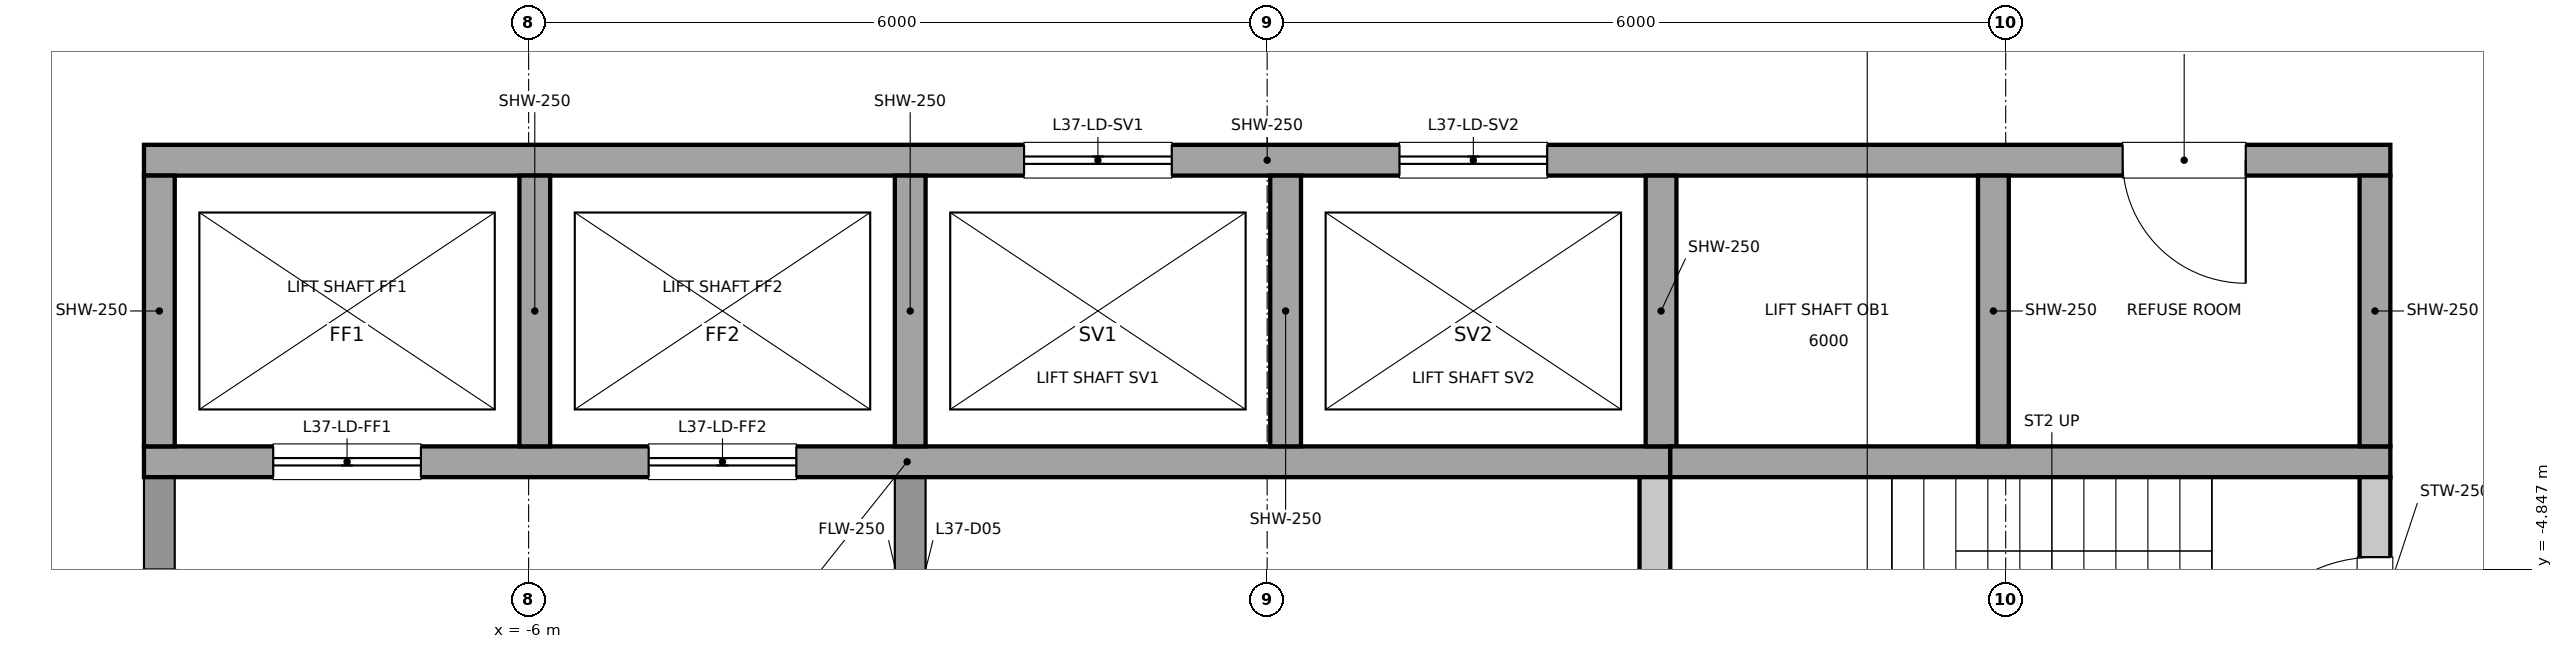
"""IFC4 building model, lengths in metres.
Left out: names, types, materials, properties, quantities, classifications, styles, units other than length and angle.
Written with IfcOpenShell. Run it as: python <this file> out.ifc"""

import sys

from ifc_helpers import new_model, si_unit, direction, frame, frame_2d, origin, place, context, subcontext, project, spatial, rectangle, extrude, element, fill, save


model = new_model("IFC4")
c1 = context("Model", 3, precision=1e-05, world=origin(), true_north=direction((0.0, 1.0)))
c2 = subcontext(c1, "Body", "Model", "MODEL_VIEW")
j1 = project(units=[si_unit("LENGTHUNIT", "METRE"), si_unit("PLANEANGLEUNIT", "RADIAN")], contexts=[c1])
p1 = place(None, origin())
s1 = spatial("IfcSite", under=j1, at=p1, CompositionType="ELEMENT")
p2 = place(p1, origin())
s2 = spatial("IfcBuilding", under=s1, at=p2, CompositionType="ELEMENT")
p3 = place(p2, frame((0.0, 0.0, 177.6)))
s3 = spatial("IfcBuildingStorey", under=s2, at=p3, CompositionType="ELEMENT", Elevation=177.6)
p4 = place(p3, frame((9.0, -6.6, 0.0), z_axis=(0.0, 0.0, 1.0), x_axis=(0.0, 1.0, 0.0)))
e1 = element("IfcWall", 1, at=p4, inside=s3, PredefinedType="SOLIDWALL", context=c2, shape_type="SweptSolid", body=[
    extrude(rectangle(XDim=2.5, YDim=0.25, at=frame_2d((1.25, 0.0))), origin(), (0.0, 0.0, 1.0), 3.85),
])
p5 = place(p4, frame((0.65, 0.0, 0.0)))
e2 = element("IfcOpeningElement", 2, at=p5, cuts=e1, PredefinedType="OPENING", context=c2, shape_type="SweptSolid", body=[
    extrude(rectangle(XDim=1.2, YDim=2.1, at=frame_2d((0.6, 1.05))), frame((0.0, 0.125, 0.0), z_axis=(0.0, -1.0, 0.0), x_axis=(1.0, 0.0, 0.0)), (0.0, 0.0, 1.0), 0.25),
])
p6 = place(p3, frame((-9.0, -6.6, 0.0), z_axis=(0.0, 0.0, 1.0), x_axis=(0.0, 1.0, 0.0)))
e3 = element("IfcWall", 3, at=p6, inside=s3, PredefinedType="PARTITIONING", context=c2, shape_type="SweptSolid", body=[
    extrude(rectangle(XDim=2.5, YDim=0.25, at=frame_2d((1.25, 0.0))), origin(), (0.0, 0.0, 1.0), 3.85),
])
p7 = place(p6, frame((0.75, 0.0, 0.0)))
e4 = element("IfcOpeningElement", 4, at=p7, cuts=e3, PredefinedType="OPENING", context=c2, shape_type="SweptSolid", body=[
    extrude(rectangle(XDim=1.0, YDim=2.1, at=frame_2d((0.5, 1.05))), frame((0.0, 0.125, 0.0), z_axis=(0.0, -1.0, 0.0), x_axis=(1.0, 0.0, 0.0)), (0.0, 0.0, 1.0), 0.25),
])
p8 = place(p3, frame((3.15, -6.6, 0.0), z_axis=(0.0, 0.0, 1.0), x_axis=(0.0, 1.0, 0.0)))
e5 = element("IfcWall", 5, at=p8, inside=s3, PredefinedType="SOLIDWALL", context=c2, shape_type="SweptSolid", body=[
    extrude(rectangle(XDim=2.5, YDim=0.25, at=frame_2d((1.25, 0.0))), origin(), (0.0, 0.0, 1.0), 3.85),
])
p9 = place(p3, frame((-2.9, -6.6, 0.0), z_axis=(0.0, 0.0, 1.0), x_axis=(0.0, 1.0, 0.0)))
e6 = element("IfcWall", 6, at=p9, inside=s3, PredefinedType="PARTITIONING", context=c2, shape_type="SweptSolid", body=[
    extrude(rectangle(XDim=2.5, YDim=0.25, at=frame_2d((1.25, 0.0))), origin(), (0.0, 0.0, 1.0), 3.85),
])
p10 = place(p9, frame((0.8, 0.0, 0.0)))
e7 = element("IfcOpeningElement", 7, at=p10, cuts=e6, PredefinedType="OPENING", context=c2, shape_type="SweptSolid", body=[
    extrude(rectangle(XDim=0.9, YDim=2.1, at=frame_2d((0.45, 1.05))), frame((0.0, 0.125, 0.0), z_axis=(0.0, -1.0, 0.0), x_axis=(1.0, 0.0, 0.0)), (0.0, 0.0, 1.0), 0.25),
])
p11 = place(p3, frame((-9.125, -1.525, 0.0), z_axis=(0.0, 0.0, 1.0), x_axis=(1.0, 0.0, 0.0)))
e8 = element("IfcWall", 8, at=p11, inside=s3, PredefinedType="SOLIDWALL", context=c2, shape_type="SweptSolid", body=[
    extrude(rectangle(XDim=18.25, YDim=0.25, at=frame_2d((9.125, 0.0))), origin(), (0.0, 0.0, 1.0), 3.85),
])
p12 = place(p11, frame((7.15, 0.0, 0.0)))
e9 = element("IfcOpeningElement", 9, at=p12, cuts=e8, PredefinedType="OPENING", context=c2, shape_type="SweptSolid", body=[
    extrude(rectangle(XDim=1.2, YDim=2.1, at=frame_2d((0.6, 1.05))), frame((0.0, 0.125, 0.0), z_axis=(0.0, -1.0, 0.0), x_axis=(1.0, 0.0, 0.0)), (0.0, 0.0, 1.0), 0.25),
])
p13 = place(p11, frame((10.2, 0.0, 0.0)))
e10 = element("IfcOpeningElement", 10, at=p13, cuts=e8, PredefinedType="OPENING", context=c2, shape_type="SweptSolid", body=[
    extrude(rectangle(XDim=1.2, YDim=2.1, at=frame_2d((0.6, 1.05))), frame((0.0, 0.125, 0.0), z_axis=(0.0, -1.0, 0.0), x_axis=(1.0, 0.0, 0.0)), (0.0, 0.0, 1.0), 0.25),
])
p14 = place(p11, frame((16.075, 0.0, 0.0)))
e11 = element("IfcOpeningElement", 11, at=p14, cuts=e8, PredefinedType="OPENING", context=c2, shape_type="SweptSolid", body=[
    extrude(rectangle(XDim=1.0, YDim=2.1, at=frame_2d((0.5, 1.05))), frame((0.0, 0.125, 0.0), z_axis=(0.0, -1.0, 0.0), x_axis=(1.0, 0.0, 0.0)), (0.0, 0.0, 1.0), 0.25),
])
p15 = place(p3, frame((-9.125, -3.975, 0.0), z_axis=(0.0, 0.0, 1.0), x_axis=(1.0, 0.0, 0.0)))
e12 = element("IfcWall", 12, at=p15, inside=s3, PredefinedType="SOLIDWALL", context=c2, shape_type="SweptSolid", body=[
    extrude(rectangle(XDim=12.4, YDim=0.25, at=frame_2d((6.2, 0.0))), origin(), (0.0, 0.0, 1.0), 3.85),
])
p16 = place(p15, frame((1.05, 0.0, 0.0)))
e13 = element("IfcOpeningElement", 13, at=p16, cuts=e12, PredefinedType="OPENING", context=c2, shape_type="SweptSolid", body=[
    extrude(rectangle(XDim=1.2, YDim=2.1, at=frame_2d((0.6, 1.05))), frame((0.0, 0.125, 0.0), z_axis=(0.0, -1.0, 0.0), x_axis=(1.0, 0.0, 0.0)), (0.0, 0.0, 1.0), 0.25),
])
p17 = place(p15, frame((4.1, 0.0, 0.0)))
e14 = element("IfcOpeningElement", 14, at=p17, cuts=e12, PredefinedType="OPENING", context=c2, shape_type="SweptSolid", body=[
    extrude(rectangle(XDim=1.2, YDim=2.1, at=frame_2d((0.6, 1.05))), frame((0.0, 0.125, 0.0), z_axis=(0.0, -1.0, 0.0), x_axis=(1.0, 0.0, 0.0)), (0.0, 0.0, 1.0), 0.25),
])
p18 = place(p3, frame((3.275, -3.975, 0.0), z_axis=(0.0, 0.0, 1.0), x_axis=(1.0, 0.0, 0.0)))
e15 = element("IfcWall", 15, at=p18, inside=s3, PredefinedType="SOLIDWALL", context=c2, shape_type="SweptSolid", body=[
    extrude(rectangle(XDim=5.85, YDim=0.25, at=frame_2d((2.925, 0.0))), origin(), (0.0, 0.0, 1.0), 3.85),
])
for number, where, z_axis, x_axis in (
    (16, (-9.0, -3.85, 0.0), (0.0, 0.0, 1.0), (0.0, 1.0, 0.0)),
    (17, (-5.95, -3.85, 0.0), (0.0, 0.0, 1.0), (0.0, 1.0, 0.0)),
    (18, (-2.9, -3.85, 0.0), (0.0, 0.0, 1.0), (0.0, 1.0, 0.0)),
    (19, (0.15, -3.85, 0.0), (0.0, 0.0, 1.0), (0.0, 1.0, 0.0)),
    (20, (3.2, -3.85, 0.0), (0.0, 0.0, 1.0), (0.0, 1.0, 0.0)),
    (21, (5.9, -3.85, 0.0), (0.0, 0.0, 1.0), (0.0, 1.0, 0.0)),
    (22, (9.0, -3.85, 0.0), (0.0, 0.0, 1.0), (0.0, 1.0, 0.0)),
):
    element("IfcWall", number, at=place(p3, frame(where, z_axis=z_axis, x_axis=x_axis)), inside=s3, PredefinedType="SOLIDWALL", context=c2, shape_type="SweptSolid", body=[
        extrude(rectangle(XDim=2.2, YDim=0.25, at=frame_2d((1.1, 0.0))), origin(), (0.0, 0.0, 1.0), 3.85),
    ])
p19 = place(p16, origin())
e23 = element("IfcDoor", 23, at=p19, inside=s3, OperationType="DOUBLE_DOOR_SLIDING", PredefinedType="DOOR", context=c2, shape_type="SweptSolid", body=[
    extrude(rectangle(XDim=1.2, YDim=2.1, at=frame_2d((0.6, 1.05))), frame((0.0, 0.025, 0.0), z_axis=(0.0, -1.0, 0.0), x_axis=(1.0, 0.0, 0.0)), (0.0, 0.0, 1.0), 0.05),
])
fill(e13, e23)
p20 = place(p17, origin())
e24 = element("IfcDoor", 24, at=p20, inside=s3, OperationType="DOUBLE_DOOR_SLIDING", PredefinedType="DOOR", context=c2, shape_type="SweptSolid", body=[
    extrude(rectangle(XDim=1.2, YDim=2.1, at=frame_2d((0.6, 1.05))), frame((0.0, 0.025, 0.0), z_axis=(0.0, -1.0, 0.0), x_axis=(1.0, 0.0, 0.0)), (0.0, 0.0, 1.0), 0.05),
])
fill(e14, e24)
p21 = place(p12, origin())
e25 = element("IfcDoor", 25, at=p21, inside=s3, OperationType="DOUBLE_DOOR_SLIDING", PredefinedType="DOOR", context=c2, shape_type="SweptSolid", body=[
    extrude(rectangle(XDim=1.2, YDim=2.1, at=frame_2d((0.6, 1.05))), frame((0.0, 0.025, 0.0), z_axis=(0.0, -1.0, 0.0), x_axis=(1.0, 0.0, 0.0)), (0.0, 0.0, 1.0), 0.05),
])
fill(e9, e25)
p22 = place(p13, origin())
e26 = element("IfcDoor", 26, at=p22, inside=s3, OperationType="DOUBLE_DOOR_SLIDING", PredefinedType="DOOR", context=c2, shape_type="SweptSolid", body=[
    extrude(rectangle(XDim=1.2, YDim=2.1, at=frame_2d((0.6, 1.05))), frame((0.0, 0.025, 0.0), z_axis=(0.0, -1.0, 0.0), x_axis=(1.0, 0.0, 0.0)), (0.0, 0.0, 1.0), 0.05),
])
fill(e10, e26)
p23 = place(p5, origin())
e27 = element("IfcDoor", 27, at=p23, inside=s3, OperationType="SINGLE_SWING_LEFT", PredefinedType="DOOR", context=c2, shape_type="SweptSolid", body=[
    extrude(rectangle(XDim=1.2, YDim=2.1, at=frame_2d((0.6, 1.05))), frame((0.0, 0.025, 0.0), z_axis=(0.0, -1.0, 0.0), x_axis=(1.0, 0.0, 0.0)), (0.0, 0.0, 1.0), 0.05),
])
fill(e2, e27)
p24 = place(p14, origin())
e28 = element("IfcDoor", 28, at=p24, inside=s3, OperationType="SINGLE_SWING_RIGHT", PredefinedType="DOOR", context=c2, shape_type="SweptSolid", body=[
    extrude(rectangle(XDim=1.0, YDim=2.1, at=frame_2d((0.5, 1.05))), frame((0.0, 0.025, 0.0), z_axis=(0.0, -1.0, 0.0), x_axis=(1.0, 0.0, 0.0)), (0.0, 0.0, 1.0), 0.05),
])
fill(e11, e28)
save(model, sys.argv[1])
